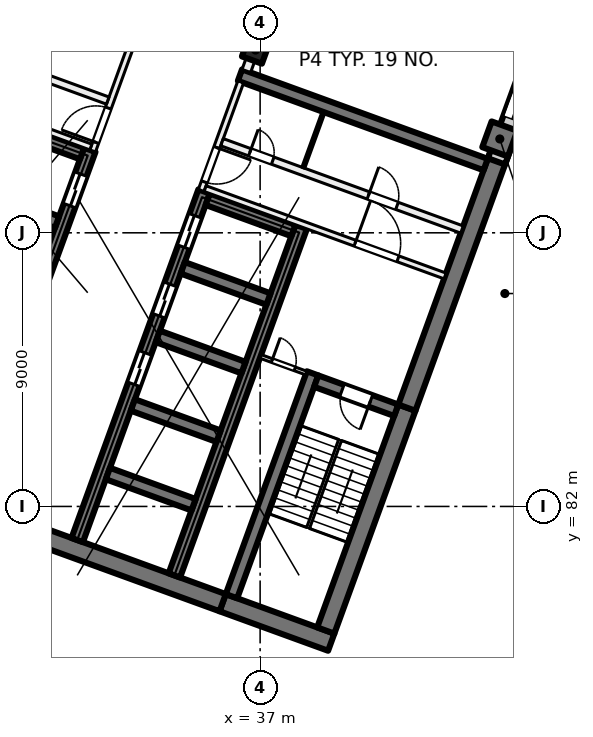
"""IFC4 building model, lengths in metres.
Left out: names, types, materials, properties, quantities, classifications, styles, units other than length and angle.
Written with IfcOpenShell. Run it as: python <this file> out.ifc"""

import sys

from ifc_helpers import new_model, si_unit, direction, frame, frame_2d, origin, origin_2d, place, context, subcontext, project, spatial, rectangle, extrude, element, fill, save


model = new_model("IFC4")
c1 = context("Model", 3, precision=1e-05, world=origin(), true_north=direction((0.0, 1.0)))
c2 = subcontext(c1, "Body", "Model", "MODEL_VIEW")
j1 = project(units=[si_unit("LENGTHUNIT", "METRE"), si_unit("PLANEANGLEUNIT", "RADIAN")], contexts=[c1])
p1 = place(None, origin())
s1 = spatial("IfcSite", under=j1, at=p1, CompositionType="ELEMENT")
p2 = place(p1, origin())
s2 = spatial("IfcBuilding", under=s1, at=p2, CompositionType="ELEMENT")
p3 = place(p2, frame((0.0, 0.0, 55.5)))
s3 = spatial("IfcBuildingStorey", under=s2, at=p3, CompositionType="ELEMENT", Elevation=55.5)
p4 = place(p3, frame((36.849, 97.011, 0.0), z_axis=(0.0, 0.0, 1.0), x_axis=(-0.342020143326, -0.939692620786, 0.0)))
e1 = element("IfcColumn", 1, at=p4, inside=s3, PredefinedType="COLUMN", context=c2, shape_type="SweptSolid", body=[
    extrude(rectangle(XDim=0.7, YDim=0.7, at=origin_2d()), origin(), (0.0, 0.0, 1.0), 4.0),
])
p5 = place(p3, frame((44.884, 94.087, 0.0), z_axis=(0.0, 0.0, 1.0), x_axis=(-0.342020143326, -0.939692620786, 0.0)))
e2 = element("IfcColumn", 2, at=p5, inside=s3, PredefinedType="COLUMN", context=c2, shape_type="SweptSolid", body=[
    extrude(rectangle(XDim=0.9, YDim=0.9, at=origin_2d()), origin(), (0.0, 0.0, 1.0), 4.0),
])
p6 = place(p3, frame((39.338, 77.535, 0.0), z_axis=(0.0, 0.0, 1.0), x_axis=(-0.939701471648, 0.341995824804, 0.0)))
e3 = element("IfcWall", 3, at=p6, inside=s3, PredefinedType="SHEAR", context=c2, shape_type="SweptSolid", body=[
    extrude(rectangle(XDim=3.8, YDim=0.6, at=frame_2d((1.9, 0.0))), origin(), (0.0, 0.0, 1.0), 4.0),
])
p7 = place(p3, frame((35.767, 78.835, 0.0), z_axis=(0.0, 0.0, 1.0), x_axis=(-0.939692894512, 0.342019391267, 0.0)))
e4 = element("IfcWall", 4, at=p7, inside=s3, PredefinedType="SHEAR", context=c2, shape_type="SweptSolid", body=[
    extrude(rectangle(XDim=14.4, YDim=0.6, at=frame_2d((7.2, 0.0))), origin(), (0.0, 0.0, 1.0), 4.0),
])
p8 = place(p3, frame((39.159, 77.92, 0.0), z_axis=(0.0, 0.0, 1.0), x_axis=(0.342016982193, 0.939693771338, 0.0)))
e5 = element("IfcWall", 5, at=p8, inside=s3, PredefinedType="SHEAR", context=c2, shape_type="SweptSolid", body=[
    extrude(rectangle(XDim=7.8, YDim=0.6, at=frame_2d((3.9, 0.0))), origin(), (0.0, 0.0, 1.0), 4.0),
])
p9 = place(p3, frame((41.827, 85.249, 0.0), z_axis=(0.0, 0.0, 1.0), x_axis=(0.342016162452, 0.939694069696, 0.0)))
e6 = element("IfcWall", 6, at=p9, inside=s3, PredefinedType="SHEAR", context=c2, shape_type="SweptSolid", body=[
    extrude(rectangle(XDim=8.9, YDim=0.6, at=frame_2d((4.45, 0.0))), origin(), (0.0, 0.0, 1.0), 4.0),
])
p10 = place(p3, frame((36.058, 79.048, 0.0), z_axis=(0.0, 0.0, 1.0), x_axis=(0.342016982193, 0.939693771338, 0.0)))
e7 = element("IfcWall", 7, at=p10, inside=s3, PredefinedType="SHEAR", context=c2, shape_type="SweptSolid", body=[
    extrude(rectangle(XDim=7.8, YDim=0.4, at=frame_2d((3.9, 0.0))), origin(), (0.0, 0.0, 1.0), 4.0),
])
p11 = place(p3, frame((41.476, 85.164, 0.0), z_axis=(0.0, 0.0, 1.0), x_axis=(-0.939678810556, 0.342058084236, 0.0)))
e8 = element("IfcWall", 8, at=p11, inside=s3, PredefinedType="SHEAR", context=c2, shape_type="SweptSolid", body=[
    extrude(rectangle(XDim=2.8, YDim=0.4, at=frame_2d((1.4, 0.0))), origin(), (0.0, 0.0, 1.0), 4.0),
])
p12 = place(p11, frame((0.9, 0.0, 0.0)))
e9 = element("IfcOpeningElement", 9, at=p12, cuts=e8, PredefinedType="OPENING", context=c2, shape_type="SweptSolid", body=[
    extrude(rectangle(XDim=1.0, YDim=2.1, at=frame_2d((0.5, 1.05))), frame((0.0, 0.21, 0.0), z_axis=(0.0, -1.0, 0.0), x_axis=(1.0, 0.0, 0.0)), (0.0, 0.0, 1.0), 0.42),
])
p13 = place(p3, frame((30.984, 80.895, 0.0), z_axis=(0.0, 0.0, 1.0), x_axis=(0.342021021735, 0.939692301071, 0.0)))
e10 = element("IfcWall", 10, at=p13, inside=s3, PredefinedType="SHEAR", context=c2, shape_type="SweptSolid", body=[
    extrude(rectangle(XDim=12.2, YDim=0.4, at=frame_2d((6.1, 0.0))), origin(), (0.0, 0.0, 1.0), 4.0),
])
p14 = place(p13, frame((5.45, 0.0, 0.0)))
e11 = element("IfcOpeningElement", 11, at=p14, cuts=e10, PredefinedType="OPENING", context=c2, shape_type="SweptSolid", body=[
    extrude(rectangle(XDim=1.1, YDim=2.1, at=frame_2d((0.55, 1.05))), frame((0.0, 0.21, 0.0), z_axis=(0.0, -1.0, 0.0), x_axis=(1.0, 0.0, 0.0)), (0.0, 0.0, 1.0), 0.42),
])
p15 = place(p13, frame((7.85, 0.0, 0.0)))
e12 = element("IfcOpeningElement", 12, at=p15, cuts=e10, PredefinedType="OPENING", context=c2, shape_type="SweptSolid", body=[
    extrude(rectangle(XDim=1.1, YDim=2.1, at=frame_2d((0.55, 1.05))), frame((0.0, 0.21, 0.0), z_axis=(0.0, -1.0, 0.0), x_axis=(1.0, 0.0, 0.0)), (0.0, 0.0, 1.0), 0.42),
])
p16 = place(p13, frame((10.25, 0.0, 0.0)))
e13 = element("IfcOpeningElement", 13, at=p16, cuts=e10, PredefinedType="OPENING", context=c2, shape_type="SweptSolid", body=[
    extrude(rectangle(XDim=1.1, YDim=2.1, at=frame_2d((0.55, 1.05))), frame((0.0, 0.21, 0.0), z_axis=(0.0, -1.0, 0.0), x_axis=(1.0, 0.0, 0.0)), (0.0, 0.0, 1.0), 0.42),
])
p17 = place(p3, frame((34.178, 79.732, 0.0), z_axis=(0.0, 0.0, 1.0), x_axis=(0.342014590177, 0.939694641948, 0.0)))
e14 = element("IfcWall", 14, at=p17, inside=s3, PredefinedType="SHEAR", context=c2, shape_type="SweptSolid", body=[
    extrude(rectangle(XDim=12.2, YDim=0.4, at=frame_2d((6.1, 0.0))), origin(), (0.0, 0.0, 1.0), 4.0),
])
for number, where, z_axis, x_axis in (
    (15, (34.812, 82.056, 0.0), (0.0, 0.0, 1.0), (-0.94, 0.342, 0.0)),
    (16, (35.632, 84.311, 0.0), (0.0, 0.0, 1.0), (-0.94, 0.342, 0.0)),
    (17, (36.453, 86.566, 0.0), (0.0, 0.0, 1.0), (-0.94, 0.342, 0.0)),
    (18, (37.274, 88.822, 0.0), (0.0, 0.0, 1.0), (-0.94, 0.342, 0.0)),
):
    element("IfcWall", number, at=place(p3, frame(where, z_axis=z_axis, x_axis=x_axis)), inside=s3, PredefinedType="SHEAR", context=c2, shape_type="SweptSolid", body=[
        extrude(rectangle(XDim=3.0, YDim=0.4, at=frame_2d((1.5, 0.0))), origin(), (0.0, 0.0, 1.0), 4.0),
    ])
p18 = place(p3, frame((38.095, 91.077, 0.0), z_axis=(0.0, 0.0, 1.0), x_axis=(-0.939676934218, 0.342063238742, 0.0)))
e19 = element("IfcWall", 19, at=p18, inside=s3, PredefinedType="SHEAR", context=c2, shape_type="SweptSolid", body=[
    extrude(rectangle(XDim=3.0, YDim=0.4, at=frame_2d((1.5, 0.0))), origin(), (0.0, 0.0, 1.0), 4.0),
])
p19 = place(p3, frame((27.225, 82.263, 0.0), z_axis=(0.0, 0.0, 1.0), x_axis=(0.342014590177, 0.939694641948, 0.0)))
e20 = element("IfcWall", 20, at=p19, inside=s3, PredefinedType="SHEAR", context=c2, shape_type="SweptSolid", body=[
    extrude(rectangle(XDim=12.2, YDim=0.4, at=frame_2d((6.1, 0.0))), origin(), (0.0, 0.0, 1.0), 4.0),
])
p20 = place(p19, frame((10.25, 0.0, 0.0)))
e21 = element("IfcOpeningElement", 21, at=p20, cuts=e20, PredefinedType="OPENING", context=c2, shape_type="SweptSolid", body=[
    extrude(rectangle(XDim=1.1, YDim=2.1, at=frame_2d((0.55, 1.05))), frame((0.0, 0.21, 0.0), z_axis=(0.0, -1.0, 0.0), x_axis=(1.0, 0.0, 0.0)), (0.0, 0.0, 1.0), 0.42),
])
p21 = place(p19, frame((0.7, 0.0, 0.0)))
e22 = element("IfcOpeningElement", 22, at=p21, cuts=e20, PredefinedType="OPENING", context=c2, shape_type="SweptSolid", body=[
    extrude(rectangle(XDim=0.8, YDim=2.1, at=frame_2d((0.4, 1.05))), frame((0.0, 0.21, 0.0), z_axis=(0.0, -1.0, 0.0), x_axis=(1.0, 0.0, 0.0)), (0.0, 0.0, 1.0), 0.42),
])
for number, where, z_axis, x_axis in (
    (23, (30.32, 91.353, 0.0), (0.0, 0.0, 1.0), (-0.94, 0.342, 0.0)),
    (24, (31.141, 93.608, 0.0), (0.0, 0.0, 1.0), (-0.94, 0.342, 0.0)),
):
    element("IfcWall", number, at=place(p3, frame(where, z_axis=z_axis, x_axis=x_axis)), inside=s3, PredefinedType="SHEAR", context=c2, shape_type="SweptSolid", body=[
        extrude(rectangle(XDim=3.0, YDim=0.4, at=frame_2d((1.5, 0.0))), origin(), (0.0, 0.0, 1.0), 4.0),
    ])
p22 = place(p3, frame((44.418, 93.245, 0.0), z_axis=(0.0, 0.0, 1.0), x_axis=(-0.93969060187, 0.342025690201, 0.0)))
e25 = element("IfcWall", 25, at=p22, inside=s3, PredefinedType="SHEAR", context=c2, shape_type="SweptSolid", body=[
    extrude(rectangle(XDim=8.6, YDim=0.4, at=frame_2d((4.3, 0.0))), origin(), (0.0, 0.0, 1.0), 4.0),
])
p23 = place(p3, frame((52.212, 113.783, 0.0), z_axis=(0.0, 0.0, 1.0), x_axis=(-0.34202521188, -0.939690775968, 0.0)))
e26 = element("IfcWall", 26, at=p23, inside=s3, PredefinedType="SOLIDWALL", context=c2, shape_type="SweptSolid", body=[
    extrude(rectangle(XDim=21.745, YDim=0.6, at=frame_2d((10.873, 0.0))), origin(), (0.0, 0.0, 1.0), 3.625),
])
p24 = place(p23, frame((3.765, 0.0, 0.9)))
e27 = element("IfcOpeningElement", 27, at=p24, cuts=e26, PredefinedType="OPENING", context=c2, shape_type="SweptSolid", body=[
    extrude(rectangle(XDim=3.0, YDim=2.4, at=frame_2d((1.5, 1.2))), frame((0.0, 0.31, 0.0), z_axis=(0.0, -1.0, 0.0), x_axis=(1.0, 0.0, 0.0)), (0.0, 0.0, 1.0), 0.62),
])
p25 = place(p23, frame((8.265, 0.0, 0.9)))
e28 = element("IfcOpeningElement", 28, at=p25, cuts=e26, PredefinedType="OPENING", context=c2, shape_type="SweptSolid", body=[
    extrude(rectangle(XDim=3.0, YDim=2.4, at=frame_2d((1.5, 1.2))), frame((0.0, 0.31, 0.0), z_axis=(0.0, -1.0, 0.0), x_axis=(1.0, 0.0, 0.0)), (0.0, 0.0, 1.0), 0.62),
])
p26 = place(p23, frame((12.765, 0.0, 0.9)))
e29 = element("IfcOpeningElement", 29, at=p26, cuts=e26, PredefinedType="OPENING", context=c2, shape_type="SweptSolid", body=[
    extrude(rectangle(XDim=3.0, YDim=2.4, at=frame_2d((1.5, 1.2))), frame((0.0, 0.31, 0.0), z_axis=(0.0, -1.0, 0.0), x_axis=(1.0, 0.0, 0.0)), (0.0, 0.0, 1.0), 0.62),
])
p27 = place(p23, frame((17.265, 0.0, 0.9)))
e30 = element("IfcOpeningElement", 30, at=p27, cuts=e26, PredefinedType="OPENING", context=c2, shape_type="SweptSolid", body=[
    extrude(rectangle(XDim=3.0, YDim=2.4, at=frame_2d((1.5, 1.2))), frame((0.0, 0.31, 0.0), z_axis=(0.0, -1.0, 0.0), x_axis=(1.0, 0.0, 0.0)), (0.0, 0.0, 1.0), 0.62),
])
p28 = place(p3, frame((31.491, 93.693, 0.0), z_axis=(0.0, 0.0, 1.0), x_axis=(0.341995824804, 0.939701471648, 0.0)))
e31 = element("IfcWall", 31, at=p28, inside=s3, PredefinedType="PARTITIONING", context=c2, shape_type="SweptSolid", body=[
    extrude(rectangle(XDim=3.8, YDim=0.2, at=frame_2d((1.9, 0.0))), origin(), (0.0, 0.0, 1.0), 3.625),
])
p29 = place(p28, frame((0.3, 0.0, 0.0)))
e32 = element("IfcOpeningElement", 32, at=p29, cuts=e31, PredefinedType="OPENING", context=c2, shape_type="SweptSolid", body=[
    extrude(rectangle(XDim=1.2, YDim=2.1, at=frame_2d((0.6, 1.05))), frame((0.0, 0.11, 0.0), z_axis=(0.0, -1.0, 0.0), x_axis=(1.0, 0.0, 0.0)), (0.0, 0.0, 1.0), 0.22),
])
p30 = place(p3, frame((23.538, 96.694, 0.0), z_axis=(0.0, 0.0, 1.0), x_axis=(0.939691552312, -0.342023078919, 0.0)))
e33 = element("IfcWall", 33, at=p30, inside=s3, PredefinedType="PARTITIONING", context=c2, shape_type="SweptSolid", body=[
    extrude(rectangle(XDim=8.4, YDim=0.2, at=frame_2d((4.2, 0.0))), origin(), (0.0, 0.0, 1.0), 3.625),
])
p31 = place(p30, frame((1.65, 0.0, 0.0)))
e34 = element("IfcOpeningElement", 34, at=p31, cuts=e33, PredefinedType="OPENING", context=c2, shape_type="SweptSolid", body=[
    extrude(rectangle(XDim=1.5, YDim=2.1, at=frame_2d((0.75, 1.05))), frame((0.0, 0.11, 0.0), z_axis=(0.0, -1.0, 0.0), x_axis=(1.0, 0.0, 0.0)), (0.0, 0.0, 1.0), 0.22),
])
p32 = place(p3, frame((24.094, 98.221, 0.0), z_axis=(0.0, 0.0, 1.0), x_axis=(0.939691552312, -0.342023078919, 0.0)))
e35 = element("IfcWall", 35, at=p32, inside=s3, PredefinedType="PARTITIONING", context=c2, shape_type="SweptSolid", body=[
    extrude(rectangle(XDim=8.4, YDim=0.25, at=frame_2d((4.2, 0.0))), origin(), (0.0, 0.0, 1.0), 3.625),
])
p33 = place(p32, frame((5.125, 0.0, 0.0)))
e36 = element("IfcOpeningElement", 36, at=p33, cuts=e35, PredefinedType="OPENING", context=c2, shape_type="SweptSolid", body=[
    extrude(rectangle(XDim=1.0, YDim=2.1, at=frame_2d((0.5, 1.05))), frame((0.0, 0.135, 0.0), z_axis=(0.0, -1.0, 0.0), x_axis=(1.0, 0.0, 0.0)), (0.0, 0.0, 1.0), 0.27),
])
p34 = place(p32, frame((0.975, 0.0, 0.0)))
e37 = element("IfcOpeningElement", 37, at=p34, cuts=e35, PredefinedType="OPENING", context=c2, shape_type="SweptSolid", body=[
    extrude(rectangle(XDim=0.8, YDim=2.1, at=frame_2d((0.4, 1.05))), frame((0.0, 0.135, 0.0), z_axis=(0.0, -1.0, 0.0), x_axis=(1.0, 0.0, 0.0)), (0.0, 0.0, 1.0), 0.27),
])
p35 = place(p3, frame((36.362, 95.964, 0.0), z_axis=(0.0, 0.0, 1.0), x_axis=(-0.341995824804, -0.939701471648, 0.0)))
e38 = element("IfcWall", 38, at=p35, inside=s3, PredefinedType="PARTITIONING", context=c2, shape_type="SweptSolid", body=[
    extrude(rectangle(XDim=3.8, YDim=0.2, at=frame_2d((1.9, 0.0))), origin(), (0.0, 0.0, 1.0), 3.625),
])
p36 = place(p35, frame((2.3, 0.0, 0.0)))
e39 = element("IfcOpeningElement", 39, at=p36, cuts=e38, PredefinedType="OPENING", context=c2, shape_type="SweptSolid", body=[
    extrude(rectangle(XDim=1.2, YDim=2.1, at=frame_2d((0.6, 1.05))), frame((0.0, 0.11, 0.0), z_axis=(0.0, -1.0, 0.0), x_axis=(1.0, 0.0, 0.0)), (0.0, 0.0, 1.0), 0.22),
])
p37 = place(p3, frame((35.19, 92.453, 0.0), z_axis=(0.0, 0.0, 1.0), x_axis=(0.939691552312, -0.342023078919, 0.0)))
e40 = element("IfcWall", 40, at=p37, inside=s3, PredefinedType="PARTITIONING", context=c2, shape_type="SweptSolid", body=[
    extrude(rectangle(XDim=8.4, YDim=0.2, at=frame_2d((4.2, 0.0))), origin(), (0.0, 0.0, 1.0), 3.625),
])
p38 = place(p37, frame((5.25, 0.0, 0.0)))
e41 = element("IfcOpeningElement", 41, at=p38, cuts=e40, PredefinedType="OPENING", context=c2, shape_type="SweptSolid", body=[
    extrude(rectangle(XDim=1.5, YDim=2.1, at=frame_2d((0.75, 1.05))), frame((0.0, 0.11, 0.0), z_axis=(0.0, -1.0, 0.0), x_axis=(1.0, 0.0, 0.0)), (0.0, 0.0, 1.0), 0.22),
])
p39 = place(p3, frame((35.746, 93.98, 0.0), z_axis=(0.0, 0.0, 1.0), x_axis=(0.939691552312, -0.342023078919, 0.0)))
e42 = element("IfcWall", 42, at=p39, inside=s3, PredefinedType="PARTITIONING", context=c2, shape_type="SweptSolid", body=[
    extrude(rectangle(XDim=8.4, YDim=0.25, at=frame_2d((4.2, 0.0))), origin(), (0.0, 0.0, 1.0), 3.625),
])
p40 = place(p39, frame((0.975, 0.0, 0.0)))
e43 = element("IfcOpeningElement", 43, at=p40, cuts=e42, PredefinedType="OPENING", context=c2, shape_type="SweptSolid", body=[
    extrude(rectangle(XDim=0.8, YDim=2.1, at=frame_2d((0.4, 1.05))), frame((0.0, 0.135, 0.0), z_axis=(0.0, -1.0, 0.0), x_axis=(1.0, 0.0, 0.0)), (0.0, 0.0, 1.0), 0.27),
])
p41 = place(p39, frame((5.125, 0.0, 0.0)))
e44 = element("IfcOpeningElement", 44, at=p41, cuts=e42, PredefinedType="OPENING", context=c2, shape_type="SweptSolid", body=[
    extrude(rectangle(XDim=1.0, YDim=2.1, at=frame_2d((0.5, 1.05))), frame((0.0, 0.135, 0.0), z_axis=(0.0, -1.0, 0.0), x_axis=(1.0, 0.0, 0.0)), (0.0, 0.0, 1.0), 0.27),
])
p42 = place(p3, frame((37.013, 86.935, 0.0), z_axis=(0.0, 0.0, 1.0), x_axis=(0.939659694648, -0.342110593602, 0.0)))
e45 = element("IfcWall", 45, at=p42, inside=s3, PredefinedType="PARTITIONING", context=c2, shape_type="SweptSolid", body=[
    extrude(rectangle(XDim=1.6, YDim=0.125, at=frame_2d((0.8, 0.0))), origin(), (0.0, 0.0, 1.0), 3.625),
])
p43 = place(p42, frame((0.4, 0.0, 0.0)))
e46 = element("IfcOpeningElement", 46, at=p43, cuts=e45, PredefinedType="OPENING", context=c2, shape_type="SweptSolid", body=[
    extrude(rectangle(XDim=0.8, YDim=2.1, at=frame_2d((0.4, 1.05))), frame((0.0, 0.073, 0.0), z_axis=(0.0, -1.0, 0.0), x_axis=(1.0, 0.0, 0.0)), (0.0, 0.0, 1.0), 0.145),
])
p44 = place(p3, frame((39.087, 94.973, 0.0), z_axis=(0.0, 0.0, 1.0), x_axis=(-0.342024501273, -0.939691034611, 0.0)))
e47 = element("IfcWall", 47, at=p44, inside=s3, PredefinedType="PARTITIONING", context=c2, shape_type="SweptSolid", body=[
    extrude(rectangle(XDim=1.95, YDim=0.1, at=frame_2d((0.975, 0.0))), origin(), (0.0, 0.0, 1.0), 3.625),
])
p45 = place(p3, frame((47.314, 125.909, 0.0), z_axis=(0.0, 0.0, 1.0), x_axis=(-0.342010770371, -0.939696032209, 0.0)))
e48 = element("IfcWall", 48, at=p45, inside=s3, PredefinedType="PARTITIONING", context=c2, shape_type="SweptSolid", body=[
    extrude(rectangle(XDim=31.485, YDim=0.3, at=frame_2d((15.742, 0.0))), origin(), (0.0, 0.0, 1.0), 3.625),
])
p46 = place(p45, frame((28.259, 0.0, 0.0)))
e49 = element("IfcOpeningElement", 49, at=p46, cuts=e48, PredefinedType="OPENING", context=c2, shape_type="SweptSolid", body=[
    extrude(rectangle(XDim=1.2, YDim=2.1, at=frame_2d((0.6, 1.05))), frame((0.0, 0.16, 0.0), z_axis=(0.0, -1.0, 0.0), x_axis=(1.0, 0.0, 0.0)), (0.0, 0.0, 1.0), 0.32),
])
p47 = place(p45, frame((23.484, 0.0, 0.0)))
e50 = element("IfcOpeningElement", 50, at=p47, cuts=e48, PredefinedType="OPENING", context=c2, shape_type="SweptSolid", body=[
    extrude(rectangle(XDim=1.0, YDim=2.1, at=frame_2d((0.5, 1.05))), frame((0.0, 0.16, 0.0), z_axis=(0.0, -1.0, 0.0), x_axis=(1.0, 0.0, 0.0)), (0.0, 0.0, 1.0), 0.32),
])
p48 = place(p45, frame((18.984, 0.0, 0.0)))
e51 = element("IfcOpeningElement", 51, at=p48, cuts=e48, PredefinedType="OPENING", context=c2, shape_type="SweptSolid", body=[
    extrude(rectangle(XDim=1.0, YDim=2.1, at=frame_2d((0.5, 1.05))), frame((0.0, 0.16, 0.0), z_axis=(0.0, -1.0, 0.0), x_axis=(1.0, 0.0, 0.0)), (0.0, 0.0, 1.0), 0.32),
])
p49 = place(p45, frame((14.385, 0.0, 0.0)))
e52 = element("IfcOpeningElement", 52, at=p49, cuts=e48, PredefinedType="OPENING", context=c2, shape_type="SweptSolid", body=[
    extrude(rectangle(XDim=1.2, YDim=2.1, at=frame_2d((0.6, 1.05))), frame((0.0, 0.16, 0.0), z_axis=(0.0, -1.0, 0.0), x_axis=(1.0, 0.0, 0.0)), (0.0, 0.0, 1.0), 0.32),
])
p50 = place(p45, frame((9.885, 0.0, 0.0)))
e53 = element("IfcOpeningElement", 53, at=p50, cuts=e48, PredefinedType="OPENING", context=c2, shape_type="SweptSolid", body=[
    extrude(rectangle(XDim=1.2, YDim=2.1, at=frame_2d((0.6, 1.05))), frame((0.0, 0.16, 0.0), z_axis=(0.0, -1.0, 0.0), x_axis=(1.0, 0.0, 0.0)), (0.0, 0.0, 1.0), 0.32),
])
p51 = place(p45, frame((5.384, 0.0, 0.0)))
e54 = element("IfcOpeningElement", 54, at=p51, cuts=e48, PredefinedType="OPENING", context=c2, shape_type="SweptSolid", body=[
    extrude(rectangle(XDim=1.2, YDim=2.1, at=frame_2d((0.6, 1.05))), frame((0.0, 0.16, 0.0), z_axis=(0.0, -1.0, 0.0), x_axis=(1.0, 0.0, 0.0)), (0.0, 0.0, 1.0), 0.32),
])
p52 = place(p27, origin())
e55 = element("IfcWindow", 55, at=p52, inside=s3, PartitioningType="SINGLE_PANEL", PredefinedType="WINDOW", context=c2, shape_type="SweptSolid", body=[
    extrude(rectangle(XDim=3.0, YDim=2.4, at=frame_2d((1.5, 1.2))), frame((0.0, 0.03, 0.0), z_axis=(0.0, -1.0, 0.0), x_axis=(1.0, 0.0, 0.0)), (0.0, 0.0, 1.0), 0.06),
])
fill(e30, e55)
p53 = place(p20, origin())
e56 = element("IfcDoor", 56, at=p53, inside=s3, OperationType="DOUBLE_DOOR_SLIDING", PredefinedType="DOOR", context=c2, shape_type="SweptSolid", body=[
    extrude(rectangle(XDim=1.1, YDim=2.1, at=frame_2d((0.55, 1.05))), frame((0.0, 0.025, 0.0), z_axis=(0.0, -1.0, 0.0), x_axis=(1.0, 0.0, 0.0)), (0.0, 0.0, 1.0), 0.05),
])
fill(e21, e56)
p54 = place(p14, origin())
e57 = element("IfcDoor", 57, at=p54, inside=s3, OperationType="DOUBLE_DOOR_SLIDING", PredefinedType="DOOR", context=c2, shape_type="SweptSolid", body=[
    extrude(rectangle(XDim=1.1, YDim=2.1, at=frame_2d((0.55, 1.05))), frame((0.0, 0.025, 0.0), z_axis=(0.0, -1.0, 0.0), x_axis=(1.0, 0.0, 0.0)), (0.0, 0.0, 1.0), 0.05),
])
fill(e11, e57)
p55 = place(p15, origin())
e58 = element("IfcDoor", 58, at=p55, inside=s3, OperationType="DOUBLE_DOOR_SLIDING", PredefinedType="DOOR", context=c2, shape_type="SweptSolid", body=[
    extrude(rectangle(XDim=1.1, YDim=2.1, at=frame_2d((0.55, 1.05))), frame((0.0, 0.025, 0.0), z_axis=(0.0, -1.0, 0.0), x_axis=(1.0, 0.0, 0.0)), (0.0, 0.0, 1.0), 0.05),
])
fill(e12, e58)
p56 = place(p16, origin())
e59 = element("IfcDoor", 59, at=p56, inside=s3, OperationType="DOUBLE_DOOR_SLIDING", PredefinedType="DOOR", context=c2, shape_type="SweptSolid", body=[
    extrude(rectangle(XDim=1.1, YDim=2.1, at=frame_2d((0.55, 1.05))), frame((0.0, 0.025, 0.0), z_axis=(0.0, -1.0, 0.0), x_axis=(1.0, 0.0, 0.0)), (0.0, 0.0, 1.0), 0.05),
])
fill(e13, e59)
p57 = place(p29, origin())
e60 = element("IfcDoor", 60, at=p57, inside=s3, OperationType="DOUBLE_DOOR_SINGLE_SWING", PredefinedType="DOOR", context=c2, shape_type="SweptSolid", body=[
    extrude(rectangle(XDim=1.2, YDim=2.1, at=frame_2d((0.6, 1.05))), frame((0.0, 0.025, 0.0), z_axis=(0.0, -1.0, 0.0), x_axis=(1.0, 0.0, 0.0)), (0.0, 0.0, 1.0), 0.05),
])
fill(e32, e60)
p58 = place(p36, origin())
e61 = element("IfcDoor", 61, at=p58, inside=s3, OperationType="DOUBLE_DOOR_SINGLE_SWING", PredefinedType="DOOR", context=c2, shape_type="SweptSolid", body=[
    extrude(rectangle(XDim=1.2, YDim=2.1, at=frame_2d((0.6, 1.05))), frame((0.0, 0.025, 0.0), z_axis=(0.0, -1.0, 0.0), x_axis=(1.0, 0.0, 0.0)), (0.0, 0.0, 1.0), 0.05),
])
fill(e39, e61)
p59 = place(p38, origin())
e62 = element("IfcDoor", 62, at=p59, inside=s3, OperationType="DOUBLE_DOOR_SINGLE_SWING", PredefinedType="DOOR", context=c2, shape_type="SweptSolid", body=[
    extrude(rectangle(XDim=1.5, YDim=2.1, at=frame_2d((0.75, 1.05))), frame((0.0, 0.025, 0.0), z_axis=(0.0, -1.0, 0.0), x_axis=(1.0, 0.0, 0.0)), (0.0, 0.0, 1.0), 0.05),
])
fill(e41, e62)
p60 = place(p12, origin())
e63 = element("IfcDoor", 63, at=p60, inside=s3, OperationType="SINGLE_SWING_RIGHT", PredefinedType="DOOR", context=c2, shape_type="SweptSolid", body=[
    extrude(rectangle(XDim=1.0, YDim=2.1, at=frame_2d((0.5, 1.05))), frame((0.0, 0.025, 0.0), z_axis=(0.0, -1.0, 0.0), x_axis=(1.0, 0.0, 0.0)), (0.0, 0.0, 1.0), 0.05),
])
fill(e9, e63)
p61 = place(p43, origin())
e64 = element("IfcDoor", 64, at=p61, inside=s3, OperationType="SINGLE_SWING_LEFT", PredefinedType="DOOR", context=c2, shape_type="SweptSolid", body=[
    extrude(rectangle(XDim=0.8, YDim=2.1, at=frame_2d((0.4, 1.05))), frame((0.0, 0.025, 0.0), z_axis=(0.0, -1.0, 0.0), x_axis=(1.0, 0.0, 0.0)), (0.0, 0.0, 1.0), 0.05),
])
fill(e46, e64)
p62 = place(p40, origin())
e65 = element("IfcDoor", 65, at=p62, inside=s3, OperationType="SINGLE_SWING_RIGHT", PredefinedType="DOOR", context=c2, shape_type="SweptSolid", body=[
    extrude(rectangle(XDim=0.8, YDim=2.1, at=frame_2d((0.4, 1.05))), frame((0.0, 0.025, 0.0), z_axis=(0.0, -1.0, 0.0), x_axis=(1.0, 0.0, 0.0)), (0.0, 0.0, 1.0), 0.05),
])
fill(e43, e65)
p63 = place(p41, origin())
e66 = element("IfcDoor", 66, at=p63, inside=s3, OperationType="SINGLE_SWING_LEFT", PredefinedType="DOOR", context=c2, shape_type="SweptSolid", body=[
    extrude(rectangle(XDim=1.0, YDim=2.1, at=frame_2d((0.5, 1.05))), frame((0.0, 0.025, 0.0), z_axis=(0.0, -1.0, 0.0), x_axis=(1.0, 0.0, 0.0)), (0.0, 0.0, 1.0), 0.05),
])
fill(e44, e66)
save(model, sys.argv[1])
